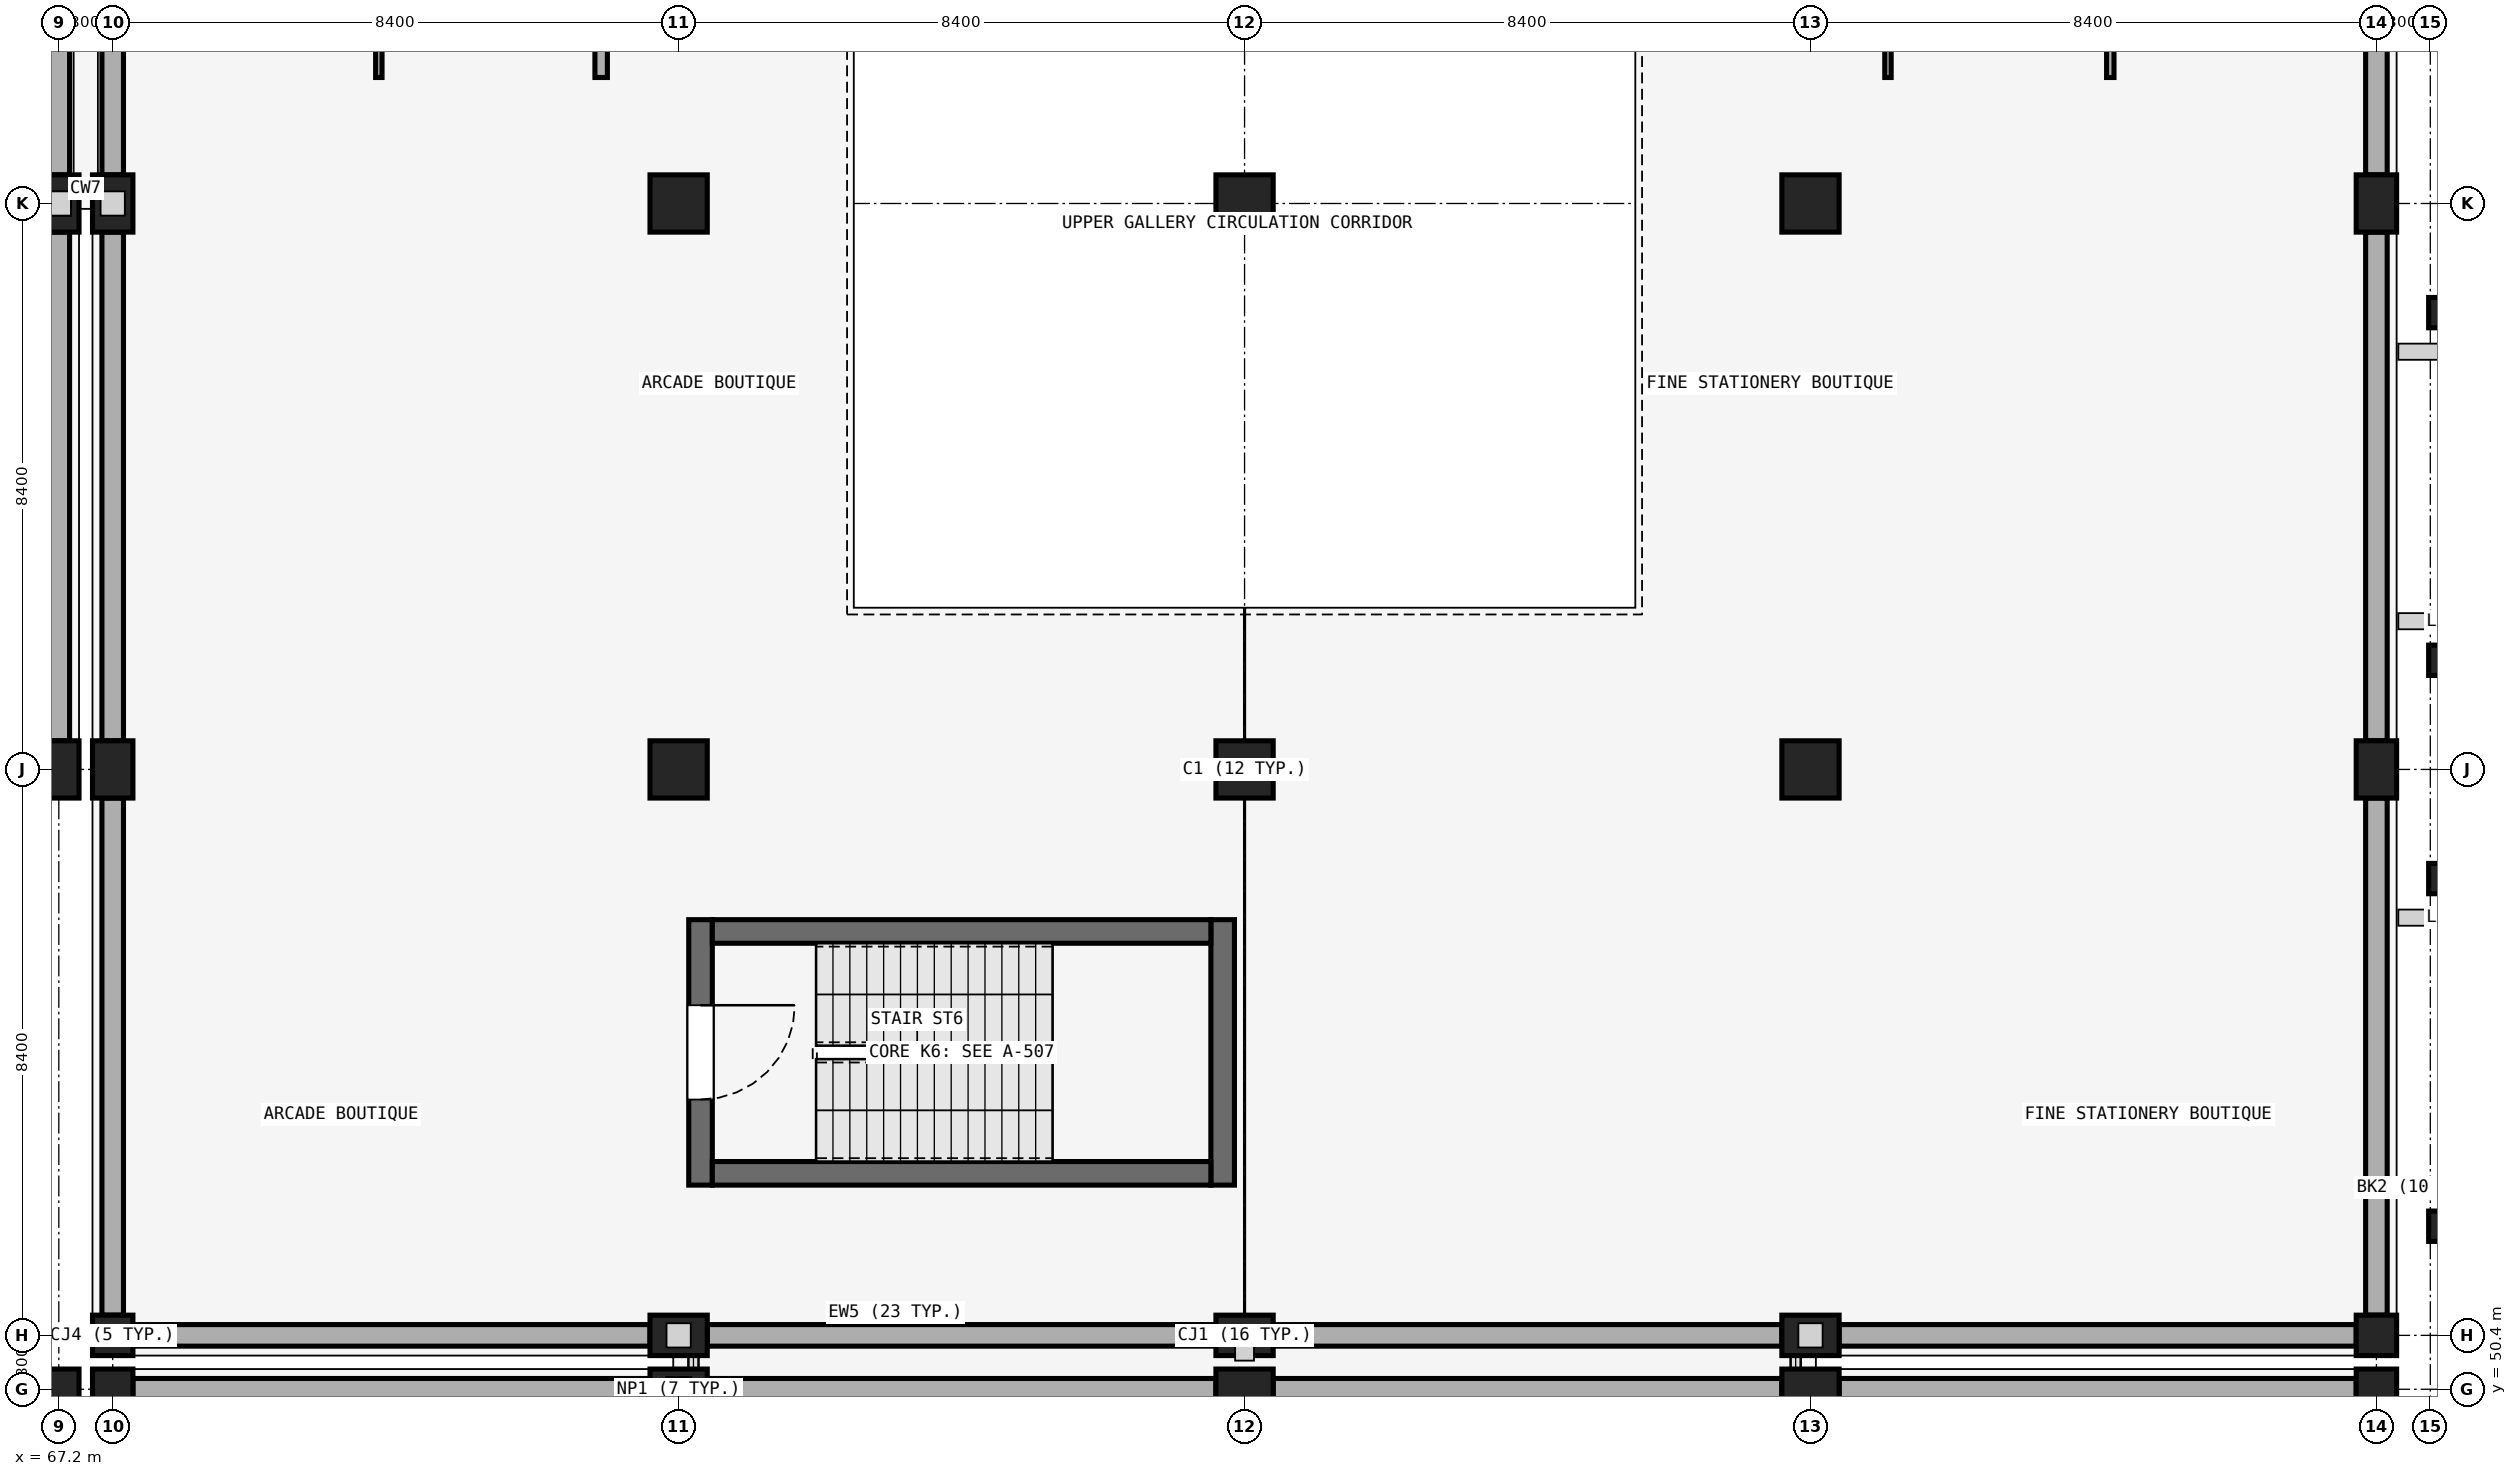
"""IFC4 building model, lengths in metres.
Left out: names, types, materials, properties, quantities, classifications, styles, units other than length and angle.
Written with IfcOpenShell. Run it as: python <this file> out.ifc"""

import sys

from ifc_helpers import new_model, si_unit, direction, frame, frame_2d, origin, origin_2d, place, context, subcontext, project, spatial, rectangle, extrude, element, fill, save


model = new_model("IFC4")
c1 = context("Model", 3, precision=1e-05, world=origin(), true_north=direction((0.0, 1.0)))
c2 = subcontext(c1, "Body", "Model", "MODEL_VIEW")
j1 = project(units=[si_unit("LENGTHUNIT", "METRE"), si_unit("PLANEANGLEUNIT", "RADIAN")], contexts=[c1])
p1 = place(None, origin())
s1 = spatial("IfcSite", under=j1, at=p1, CompositionType="ELEMENT")
p2 = place(p1, origin())
s2 = spatial("IfcBuilding", under=s1, at=p2, CompositionType="ELEMENT")
p3 = place(p2, frame((0.0, 0.0, 5.4)))
s3 = spatial("IfcBuildingStorey", under=s2, at=p3, CompositionType="ELEMENT", Elevation=5.4)
for number, where, z_axis, x_axis in (
    (1, (67.2, 59.6, 0.0), (0.0, 0.0, 1.0), (1.0, 0.0, 0.0)),
    (2, (67.2, 68.0, 0.0), (0.0, 0.0, 1.0), (1.0, 0.0, 0.0)),
):
    element("IfcColumn", number, at=place(p3, frame(where, z_axis=z_axis, x_axis=x_axis)), inside=s3, PredefinedType="COLUMN", context=c2, shape_type="SweptSolid", body=[
        extrude(rectangle(XDim=0.6, YDim=0.85, at=origin_2d()), origin(), (0.0, 0.0, 1.0), 4.5),
    ])
p4 = place(p3, frame((68.0, 50.4, 0.0), z_axis=(0.0, 0.0, 1.0), x_axis=(1.0, 0.0, 0.0)))
e3 = element("IfcColumn", 3, at=p4, inside=s3, PredefinedType="COLUMN", context=c2, shape_type="SweptSolid", body=[
    extrude(rectangle(XDim=0.6, YDim=0.6, at=origin_2d()), origin(), (0.0, 0.0, 1.0), 4.5),
])
for number, where, z_axis, x_axis in (
    (4, (76.4, 50.4, 0.0), (0.0, 0.0, 1.0), (0.0, 1.0, 0.0)),
    (5, (84.8, 50.4, 0.0), (0.0, 0.0, 1.0), (0.0, 1.0, 0.0)),
    (6, (93.2, 50.4, 0.0), (0.0, 0.0, 1.0), (0.0, 1.0, 0.0)),
):
    element("IfcColumn", number, at=place(p3, frame(where, z_axis=z_axis, x_axis=x_axis)), inside=s3, PredefinedType="COLUMN", context=c2, shape_type="SweptSolid", body=[
        extrude(rectangle(XDim=0.6, YDim=0.85, at=origin_2d()), origin(), (0.0, 0.0, 1.0), 4.5),
    ])
for number, where, z_axis, x_axis in (
    (7, (101.6, 50.4, 0.0), (0.0, 0.0, 1.0), (1.0, 0.0, 0.0)),
    (8, (68.0, 51.2, 0.0), (0.0, 0.0, 1.0), (1.0, 0.0, 0.0)),
):
    element("IfcColumn", number, at=place(p3, frame(where, z_axis=z_axis, x_axis=x_axis)), inside=s3, PredefinedType="COLUMN", context=c2, shape_type="SweptSolid", body=[
        extrude(rectangle(XDim=0.6, YDim=0.6, at=origin_2d()), origin(), (0.0, 0.0, 1.0), 4.5),
    ])
for number, where, z_axis, x_axis in (
    (9, (76.4, 51.2, 0.0), (0.0, 0.0, 1.0), (0.0, 1.0, 0.0)),
    (10, (84.8, 51.2, 0.0), (0.0, 0.0, 1.0), (0.0, 1.0, 0.0)),
    (11, (93.2, 51.2, 0.0), (0.0, 0.0, 1.0), (0.0, 1.0, 0.0)),
):
    element("IfcColumn", number, at=place(p3, frame(where, z_axis=z_axis, x_axis=x_axis)), inside=s3, PredefinedType="COLUMN", context=c2, shape_type="SweptSolid", body=[
        extrude(rectangle(XDim=0.6, YDim=0.85, at=origin_2d()), origin(), (0.0, 0.0, 1.0), 4.5),
    ])
p5 = place(p3, frame((101.6, 51.2, 0.0), z_axis=(0.0, 0.0, 1.0), x_axis=(1.0, 0.0, 0.0)))
e12 = element("IfcColumn", 12, at=p5, inside=s3, PredefinedType="COLUMN", context=c2, shape_type="SweptSolid", body=[
    extrude(rectangle(XDim=0.6, YDim=0.6, at=origin_2d()), origin(), (0.0, 0.0, 1.0), 4.5),
])
p6 = place(p3, frame((68.0, 59.6, 0.0), z_axis=(0.0, 0.0, 1.0), x_axis=(1.0, 0.0, 0.0)))
e13 = element("IfcColumn", 13, at=p6, inside=s3, PredefinedType="COLUMN", context=c2, shape_type="SweptSolid", body=[
    extrude(rectangle(XDim=0.6, YDim=0.85, at=origin_2d()), origin(), (0.0, 0.0, 1.0), 4.5),
])
for number, where, z_axis, x_axis in (
    (14, (76.4, 59.6, 0.0), (0.0, 0.0, 1.0), (1.0, 0.0, 0.0)),
    (15, (84.8, 59.6, 0.0), (0.0, 0.0, 1.0), (1.0, 0.0, 0.0)),
    (16, (93.2, 59.6, 0.0), (0.0, 0.0, 1.0), (1.0, 0.0, 0.0)),
):
    element("IfcColumn", number, at=place(p3, frame(where, z_axis=z_axis, x_axis=x_axis)), inside=s3, PredefinedType="COLUMN", context=c2, shape_type="SweptSolid", body=[
        extrude(rectangle(XDim=0.85, YDim=0.85, at=origin_2d()), origin(), (0.0, 0.0, 1.0), 4.5),
    ])
for number, where, z_axis, x_axis in (
    (17, (101.6, 59.6, 0.0), (0.0, 0.0, 1.0), (1.0, 0.0, 0.0)),
    (18, (68.0, 68.0, 0.0), (0.0, 0.0, 1.0), (1.0, 0.0, 0.0)),
):
    element("IfcColumn", number, at=place(p3, frame(where, z_axis=z_axis, x_axis=x_axis)), inside=s3, PredefinedType="COLUMN", context=c2, shape_type="SweptSolid", body=[
        extrude(rectangle(XDim=0.6, YDim=0.85, at=origin_2d()), origin(), (0.0, 0.0, 1.0), 4.5),
    ])
for number, where, z_axis, x_axis in (
    (19, (76.4, 68.0, 0.0), (0.0, 0.0, 1.0), (1.0, 0.0, 0.0)),
    (20, (84.8, 68.0, 0.0), (0.0, 0.0, 1.0), (1.0, 0.0, 0.0)),
    (21, (93.2, 68.0, 0.0), (0.0, 0.0, 1.0), (1.0, 0.0, 0.0)),
):
    element("IfcColumn", number, at=place(p3, frame(where, z_axis=z_axis, x_axis=x_axis)), inside=s3, PredefinedType="COLUMN", context=c2, shape_type="SweptSolid", body=[
        extrude(rectangle(XDim=0.85, YDim=0.85, at=origin_2d()), origin(), (0.0, 0.0, 1.0), 4.5),
    ])
p7 = place(p3, frame((101.6, 68.0, 0.0), z_axis=(0.0, 0.0, 1.0), x_axis=(1.0, 0.0, 0.0)))
e22 = element("IfcColumn", 22, at=p7, inside=s3, PredefinedType="COLUMN", context=c2, shape_type="SweptSolid", body=[
    extrude(rectangle(XDim=0.6, YDim=0.85, at=origin_2d()), origin(), (0.0, 0.0, 1.0), 4.5),
])
p8 = place(p3, frame((67.2, 50.4, 0.0), z_axis=(0.0, 0.0, 1.0), x_axis=(1.0, 0.0, 0.0)))
e23 = element("IfcColumn", 23, at=p8, inside=s3, PredefinedType="COLUMN", context=c2, shape_type="SweptSolid", body=[
    extrude(rectangle(XDim=0.6, YDim=0.6, at=origin_2d()), origin(), (0.0, 0.0, 1.0), 4.5),
])
for number, where, z_axis, x_axis in (
    (24, (102.65, 52.82, 0.0), (0.0, 0.0, 1.0), (0.0, 1.0, 0.0)),
    (25, (102.65, 57.98, 0.0), (0.0, 0.0, 1.0), (0.0, 1.0, 0.0)),
    (26, (102.65, 61.22, 0.0), (0.0, 0.0, 1.0), (0.0, 1.0, 0.0)),
    (27, (102.65, 66.38, 0.0), (0.0, 0.0, 1.0), (0.0, 1.0, 0.0)),
):
    element("IfcColumn", number, at=place(p3, frame(where, z_axis=z_axis, x_axis=x_axis)), inside=s3, PredefinedType="PILASTER", context=c2, shape_type="SweptSolid", body=[
        extrude(rectangle(XDim=0.45, YDim=0.55, at=origin_2d()), origin(), (0.0, 0.0, 1.0), 4.5),
    ])
for number, where, z_axis, x_axis in (
    (28, (67.2, 60.025, 0.0), (0.0, 0.0, 1.0), (0.0, 1.0, 0.0)),
    (29, (67.2, 68.425, 0.0), (0.0, 0.0, 1.0), (0.0, 1.0, 0.0)),
):
    element("IfcWall", number, at=place(p3, frame(where, z_axis=z_axis, x_axis=x_axis)), inside=s3, PredefinedType="SOLIDWALL", context=c2, shape_type="SweptSolid", body=[
        extrude(rectangle(XDim=7.55, YDim=0.32, at=frame_2d((3.775, 0.0))), origin(), (0.0, 0.0, 1.0), 3.45),
    ])
p9 = place(p3, frame((68.3, 50.4, 0.0), z_axis=(0.0, 0.0, 1.0), x_axis=(1.0, 0.0, 0.0)))
e30 = element("IfcWall", 30, at=p9, inside=s3, PredefinedType="SOLIDWALL", context=c2, shape_type="SweptSolid", body=[
    extrude(rectangle(XDim=7.675, YDim=0.32, at=frame_2d((3.837, 0.0))), origin(), (0.0, 0.0, 1.0), 3.45),
])
p10 = place(p3, frame((76.825, 50.4, 0.0), z_axis=(0.0, 0.0, 1.0), x_axis=(1.0, 0.0, 0.0)))
e31 = element("IfcWall", 31, at=p10, inside=s3, PredefinedType="SOLIDWALL", context=c2, shape_type="SweptSolid", body=[
    extrude(rectangle(XDim=7.55, YDim=0.32, at=frame_2d((3.775, 0.0))), origin(), (0.0, 0.0, 1.0), 3.45),
])
p11 = place(p3, frame((85.225, 50.4, 0.0), z_axis=(0.0, 0.0, 1.0), x_axis=(1.0, 0.0, 0.0)))
e32 = element("IfcWall", 32, at=p11, inside=s3, PredefinedType="SOLIDWALL", context=c2, shape_type="SweptSolid", body=[
    extrude(rectangle(XDim=7.55, YDim=0.32, at=frame_2d((3.775, 0.0))), origin(), (0.0, 0.0, 1.0), 3.45),
])
for number, where, z_axis, x_axis in (
    (33, (93.625, 50.4, 0.0), (0.0, 0.0, 1.0), (1.0, 0.0, 0.0)),
    (34, (68.3, 51.2, 0.0), (0.0, 0.0, 1.0), (1.0, 0.0, 0.0)),
):
    element("IfcWall", number, at=place(p3, frame(where, z_axis=z_axis, x_axis=x_axis)), inside=s3, PredefinedType="SOLIDWALL", context=c2, shape_type="SweptSolid", body=[
        extrude(rectangle(XDim=7.675, YDim=0.32, at=frame_2d((3.837, 0.0))), origin(), (0.0, 0.0, 1.0), 3.45),
    ])
p12 = place(p3, frame((76.825, 51.2, 0.0), z_axis=(0.0, 0.0, 1.0), x_axis=(1.0, 0.0, 0.0)))
e35 = element("IfcWall", 35, at=p12, inside=s3, PredefinedType="SOLIDWALL", context=c2, shape_type="SweptSolid", body=[
    extrude(rectangle(XDim=7.55, YDim=0.32, at=frame_2d((3.775, 0.0))), origin(), (0.0, 0.0, 1.0), 3.45),
])
p13 = place(p3, frame((85.225, 51.2, 0.0), z_axis=(0.0, 0.0, 1.0), x_axis=(1.0, 0.0, 0.0)))
e36 = element("IfcWall", 36, at=p13, inside=s3, PredefinedType="SOLIDWALL", context=c2, shape_type="SweptSolid", body=[
    extrude(rectangle(XDim=7.55, YDim=0.32, at=frame_2d((3.775, 0.0))), origin(), (0.0, 0.0, 1.0), 3.45),
])
for number, where, z_axis, x_axis in (
    (37, (93.625, 51.2, 0.0), (0.0, 0.0, 1.0), (1.0, 0.0, 0.0)),
    (38, (68.0, 51.5, 0.0), (0.0, 0.0, 1.0), (0.0, 1.0, 0.0)),
):
    element("IfcWall", number, at=place(p3, frame(where, z_axis=z_axis, x_axis=x_axis)), inside=s3, PredefinedType="SOLIDWALL", context=c2, shape_type="SweptSolid", body=[
        extrude(rectangle(XDim=7.675, YDim=0.32, at=frame_2d((3.837, 0.0))), origin(), (0.0, 0.0, 1.0), 3.45),
    ])
for number, where, z_axis, x_axis in (
    (39, (68.0, 60.025, 0.0), (0.0, 0.0, 1.0), (0.0, 1.0, 0.0)),
    (40, (68.0, 68.425, 0.0), (0.0, 0.0, 1.0), (0.0, 1.0, 0.0)),
):
    element("IfcWall", number, at=place(p3, frame(where, z_axis=z_axis, x_axis=x_axis)), inside=s3, PredefinedType="SOLIDWALL", context=c2, shape_type="SweptSolid", body=[
        extrude(rectangle(XDim=7.55, YDim=0.32, at=frame_2d((3.775, 0.0))), origin(), (0.0, 0.0, 1.0), 3.45),
    ])
p14 = place(p3, frame((101.6, 51.5, 0.0), z_axis=(0.0, 0.0, 1.0), x_axis=(0.0, 1.0, 0.0)))
e41 = element("IfcWall", 41, at=p14, inside=s3, PredefinedType="SOLIDWALL", context=c2, shape_type="SweptSolid", body=[
    extrude(rectangle(XDim=7.675, YDim=0.32, at=frame_2d((3.837, 0.0))), origin(), (0.0, 0.0, 1.0), 3.45),
])
for number, where, z_axis, x_axis in (
    (42, (101.6, 60.025, 0.0), (0.0, 0.0, 1.0), (0.0, 1.0, 0.0)),
    (43, (101.6, 68.425, 0.0), (0.0, 0.0, 1.0), (0.0, 1.0, 0.0)),
):
    element("IfcWall", number, at=place(p3, frame(where, z_axis=z_axis, x_axis=x_axis)), inside=s3, PredefinedType="SOLIDWALL", context=c2, shape_type="SweptSolid", body=[
        extrude(rectangle(XDim=7.55, YDim=0.32, at=frame_2d((3.775, 0.0))), origin(), (0.0, 0.0, 1.0), 3.45),
    ])
p15 = place(p3, frame((76.725, 57.37, 0.0), z_axis=(0.0, 0.0, 1.0), x_axis=(0.0, -1.0, 0.0)))
e44 = element("IfcWall", 44, at=p15, inside=s3, PredefinedType="SHEAR", context=c2, shape_type="SweptSolid", body=[
    extrude(rectangle(XDim=3.94, YDim=0.35, at=frame_2d((1.97, 0.0))), origin(), (0.0, 0.0, 1.0), 4.2),
])
p16 = place(p15, frame((1.27, 0.0, 0.0)))
e45 = element("IfcOpeningElement", 45, at=p16, cuts=e44, PredefinedType="OPENING", context=c2, shape_type="SweptSolid", body=[
    extrude(rectangle(XDim=1.4, YDim=2.15, at=frame_2d((0.7, 1.075))), frame((0.0, 0.185, 0.0), z_axis=(0.0, -1.0, 0.0), x_axis=(1.0, 0.0, 0.0)), (0.0, 0.0, 1.0), 0.37),
])
p17 = place(p3, frame((84.475, 53.43, 0.0), z_axis=(0.0, 0.0, 1.0), x_axis=(0.0, 1.0, 0.0)))
e46 = element("IfcWall", 46, at=p17, inside=s3, PredefinedType="SHEAR", context=c2, shape_type="SweptSolid", body=[
    extrude(rectangle(XDim=3.94, YDim=0.35, at=frame_2d((1.97, 0.0))), origin(), (0.0, 0.0, 1.0), 4.2),
])
for number, where, z_axis, x_axis in (
    (47, (76.9, 53.605, 0.0), (0.0, 0.0, 1.0), (1.0, 0.0, 0.0)),
    (48, (76.9, 57.195, 0.0), (0.0, 0.0, 1.0), (1.0, 0.0, 0.0)),
):
    element("IfcWall", number, at=place(p3, frame(where, z_axis=z_axis, x_axis=x_axis)), inside=s3, PredefinedType="SHEAR", context=c2, shape_type="SweptSolid", body=[
        extrude(rectangle(XDim=7.4, YDim=0.35, at=frame_2d((3.7, 0.0))), origin(), (0.0, 0.0, 1.0), 4.2),
    ])
p18 = place(p3, frame((71.95, 69.87, 0.0), z_axis=(0.0, 0.0, 1.0), x_axis=(0.0, 1.0, 0.0)))
e49 = element("IfcWall", 49, at=p18, inside=s3, PredefinedType="PARTITIONING", context=c2, shape_type="SweptSolid", body=[
    extrude(rectangle(XDim=7.46, YDim=0.095, at=frame_2d((3.73, 0.0))), origin(), (0.0, 0.0, 1.0), 3.45),
])
p19 = place(p18, frame((3.17, 0.0, 0.0)))
e50 = element("IfcOpeningElement", 50, at=p19, cuts=e49, PredefinedType="OPENING", context=c2, shape_type="SweptSolid", body=[
    extrude(rectangle(XDim=1.12, YDim=2.22, at=frame_2d((0.56, 1.11))), frame((0.0, 0.057, 0.0), z_axis=(0.0, -1.0, 0.0), x_axis=(1.0, 0.0, 0.0)), (0.0, 0.0, 1.0), 0.115),
])
p20 = place(p3, frame((75.25, 69.87, 0.0), z_axis=(0.0, 0.0, 1.0), x_axis=(0.0, 1.0, 0.0)))
e51 = element("IfcWall", 51, at=p20, inside=s3, PredefinedType="PARTITIONING", context=c2, shape_type="SweptSolid", body=[
    extrude(rectangle(XDim=7.46, YDim=0.185, at=frame_2d((3.73, 0.0))), origin(), (0.0, 0.0, 1.0), 3.45),
])
p21 = place(p20, frame((3.17, 0.0, 0.0)))
e52 = element("IfcOpeningElement", 52, at=p21, cuts=e51, PredefinedType="OPENING", context=c2, shape_type="SweptSolid", body=[
    extrude(rectangle(XDim=1.12, YDim=2.34, at=frame_2d((0.56, 1.17))), frame((0.0, 0.103, 0.0), z_axis=(0.0, -1.0, 0.0), x_axis=(1.0, 0.0, 0.0)), (0.0, 0.0, 1.0), 0.205),
])
p22 = place(p3, frame((97.65, 69.87, 0.0), z_axis=(0.0, 0.0, 1.0), x_axis=(0.0, 1.0, 0.0)))
e53 = element("IfcWall", 53, at=p22, inside=s3, PredefinedType="PARTITIONING", context=c2, shape_type="SweptSolid", body=[
    extrude(rectangle(XDim=7.46, YDim=0.11, at=frame_2d((3.73, 0.0))), origin(), (0.0, 0.0, 1.0), 3.45),
])
p23 = place(p22, frame((3.14, 0.0, 0.0)))
e54 = element("IfcOpeningElement", 54, at=p23, cuts=e53, PredefinedType="OPENING", context=c2, shape_type="SweptSolid", body=[
    extrude(rectangle(XDim=1.18, YDim=2.46, at=frame_2d((0.59, 1.23))), frame((0.0, 0.065, 0.0), z_axis=(0.0, -1.0, 0.0), x_axis=(1.0, 0.0, 0.0)), (0.0, 0.0, 1.0), 0.13),
])
p24 = place(p3, frame((94.35, 69.87, 0.0), z_axis=(0.0, 0.0, 1.0), x_axis=(0.0, 1.0, 0.0)))
e55 = element("IfcWall", 55, at=p24, inside=s3, PredefinedType="PARTITIONING", context=c2, shape_type="SweptSolid", body=[
    extrude(rectangle(XDim=7.46, YDim=0.095, at=frame_2d((3.73, 0.0))), origin(), (0.0, 0.0, 1.0), 3.45),
])
p25 = place(p24, frame((3.09, 0.0, 0.0)))
e56 = element("IfcOpeningElement", 56, at=p25, cuts=e55, PredefinedType="OPENING", context=c2, shape_type="SweptSolid", body=[
    extrude(rectangle(XDim=1.28, YDim=2.1, at=frame_2d((0.64, 1.05))), frame((0.0, 0.057, 0.0), z_axis=(0.0, -1.0, 0.0), x_axis=(1.0, 0.0, 0.0)), (0.0, 0.0, 1.0), 0.115),
])
p26 = place(p16, origin())
e57 = element("IfcDoor", 57, at=p26, inside=s3, OperationType="SINGLE_SWING_LEFT", PredefinedType="DOOR", context=c2, shape_type="SweptSolid", body=[
    extrude(rectangle(XDim=1.4, YDim=2.15, at=frame_2d((0.7, 1.075))), frame((0.0, 0.025, 0.0), z_axis=(0.0, -1.0, 0.0), x_axis=(1.0, 0.0, 0.0)), (0.0, 0.0, 1.0), 0.05),
])
fill(e45, e57)
save(model, sys.argv[1])
